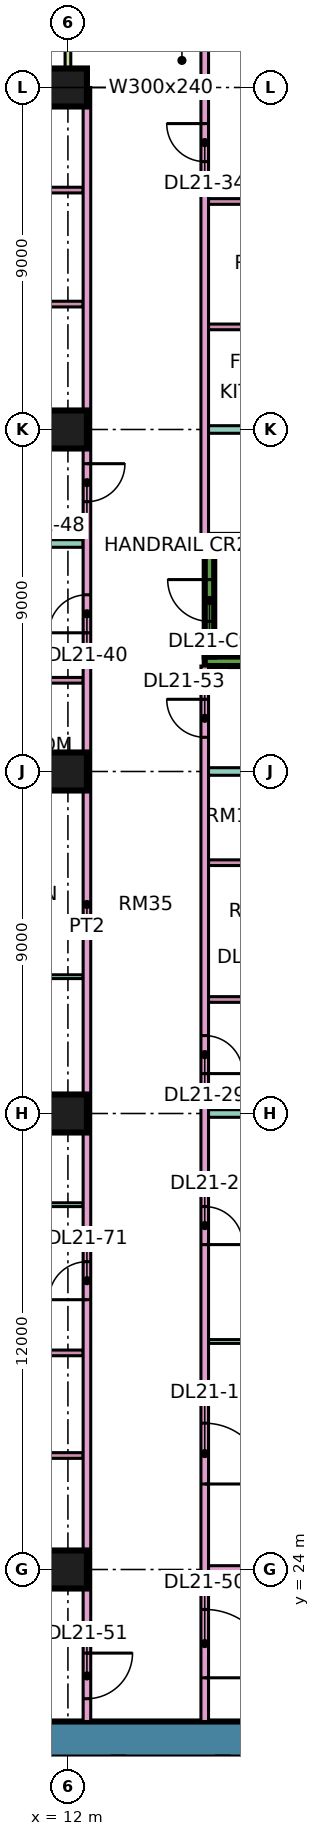
"""IFC4 building model, lengths in metres.
Left out: names, types, materials, properties, quantities, classifications, styles, units other than length and angle.
Written with IfcOpenShell. Run it as: python <this file> out.ifc"""

import sys

from ifc_helpers import new_model, si_unit, direction, frame, frame_2d, origin, origin_2d, place, context, subcontext, project, spatial, rectangle, extrude, element, fill, save


model = new_model("IFC4")
c1 = context("Model", 3, precision=1e-05, world=origin(), true_north=direction((0.0, 1.0)))
c2 = subcontext(c1, "Body", "Model", "MODEL_VIEW")
j1 = project(units=[si_unit("LENGTHUNIT", "METRE"), si_unit("PLANEANGLEUNIT", "RADIAN")], contexts=[c1])
p1 = place(None, origin())
s1 = spatial("IfcSite", under=j1, at=p1, CompositionType="ELEMENT")
p2 = place(p1, origin())
s2 = spatial("IfcBuilding", under=s1, at=p2, CompositionType="ELEMENT")
p3 = place(p2, frame((0.0, 0.0, 95.65)))
s3 = spatial("IfcBuildingStorey", under=s2, at=p3, CompositionType="ELEMENT", Elevation=95.65)
for number, where, z_axis, x_axis in (
    (1, (12.0, 24.0, 0.0), (0.0, 0.0, 1.0), (1.0, 0.0, 0.0)),
    (2, (12.0, 36.0, 0.0), (0.0, 0.0, 1.0), (1.0, 0.0, 0.0)),
    (3, (12.0, 45.0, 0.0), (0.0, 0.0, 1.0), (1.0, 0.0, 0.0)),
    (4, (12.0, 54.0, 0.0), (0.0, 0.0, 1.0), (1.0, 0.0, 0.0)),
    (5, (12.0, 63.0, 0.0), (0.0, 0.0, 1.0), (1.0, 0.0, 0.0)),
):
    element("IfcColumn", number, at=place(p3, frame(where, z_axis=z_axis, x_axis=x_axis)), inside=s3, PredefinedType="COLUMN", context=c2, shape_type="SweptSolid", body=[
        extrude(rectangle(XDim=1.0, YDim=1.0, at=origin_2d()), origin(), (0.0, 0.0, 1.0), 3.75),
    ])
p4 = place(p3, frame((9.0, 19.525, 0.0), z_axis=(0.0, 0.0, 1.0), x_axis=(1.0, 0.0, 0.0)))
e6 = element("IfcWall", 6, at=p4, inside=s3, PredefinedType="SHEAR", context=c2, shape_type="SweptSolid", body=[
    extrude(rectangle(XDim=25.0, YDim=0.95, at=frame_2d((12.5, 0.0))), origin(), (0.0, 0.0, 1.0), 3.75),
])
p5 = place(p4, frame((19.1, 0.0, 0.0)))
e7 = element("IfcOpeningElement", 7, at=p5, cuts=e6, PredefinedType="OPENING", context=c2, shape_type="SweptSolid", body=[
    extrude(rectangle(XDim=1.8, YDim=2.4, at=frame_2d((0.9, 1.2))), frame((0.0, 0.485, 0.0), z_axis=(0.0, -1.0, 0.0), x_axis=(1.0, 0.0, 0.0)), (0.0, 0.0, 1.0), 0.97),
])
for number, where, z_axis, x_axis in (
    (8, (15.6, 47.9, 0.0), (0.0, 0.0, 1.0), (1.0, 0.0, 0.0)),
    (9, (15.6, 51.1, 0.0), (0.0, 0.0, 1.0), (1.0, 0.0, 0.0)),
):
    element("IfcWall", number, at=place(p3, frame(where, z_axis=z_axis, x_axis=x_axis)), inside=s3, PredefinedType="SHEAR", context=c2, shape_type="SweptSolid", body=[
        extrude(rectangle(XDim=7.0, YDim=0.25, at=frame_2d((3.5, 0.0))), origin(), (0.0, 0.0, 1.0), 3.75),
    ])
p6 = place(p3, frame((15.725, 48.025, 0.0), z_axis=(0.0, 0.0, 1.0), x_axis=(0.0, 1.0, 0.0)))
e10 = element("IfcWall", 10, at=p6, inside=s3, PredefinedType="SHEAR", context=c2, shape_type="SweptSolid", body=[
    extrude(rectangle(XDim=2.95, YDim=0.25, at=frame_2d((1.475, 0.0))), origin(), (0.0, 0.0, 1.0), 3.75),
])
p7 = place(p6, frame((0.925, 0.0, 0.0)))
e11 = element("IfcOpeningElement", 11, at=p7, cuts=e10, PredefinedType="OPENING", context=c2, shape_type="SweptSolid", body=[
    extrude(rectangle(XDim=1.1, YDim=2.2, at=frame_2d((0.55, 1.1))), frame((0.0, 0.135, 0.0), z_axis=(0.0, -1.0, 0.0), x_axis=(1.0, 0.0, 0.0)), (0.0, 0.0, 1.0), 0.27),
])
p8 = place(p3, frame((11.925, 63.0, 0.0), z_axis=(0.0, 0.0, 1.0), x_axis=(-1.0, 0.0, 0.0)))
e12 = element("IfcWall", 12, at=p8, inside=s3, PredefinedType="SOLIDWALL", context=c2, shape_type="SweptSolid", body=[
    extrude(rectangle(XDim=10.35, YDim=0.15, at=frame_2d((5.175, 0.0))), origin(), (0.0, 0.0, 1.0), 3.35),
])
p9 = place(p8, frame((1.175, 0.0, 0.45)))
e13 = element("IfcOpeningElement", 13, at=p9, cuts=e12, PredefinedType="OPENING", context=c2, shape_type="SweptSolid", body=[
    extrude(rectangle(XDim=3.0, YDim=2.4, at=frame_2d((1.5, 1.2))), frame((0.0, 0.085, 0.0), z_axis=(0.0, -1.0, 0.0), x_axis=(1.0, 0.0, 0.0)), (0.0, 0.0, 1.0), 0.17),
])
p10 = place(p8, frame((6.688, 0.0, 0.0)))
e14 = element("IfcOpeningElement", 14, at=p10, cuts=e12, PredefinedType="OPENING", context=c2, shape_type="SweptSolid", body=[
    extrude(rectangle(XDim=1.8, YDim=2.4, at=frame_2d((0.9, 1.2))), frame((0.0, 0.085, 0.0), z_axis=(0.0, -1.0, 0.0), x_axis=(1.0, 0.0, 0.0)), (0.0, 0.0, 1.0), 0.17),
])
p11 = place(p3, frame((12.0, 64.5, 0.0), z_axis=(0.0, 0.0, 1.0), x_axis=(0.0, -1.0, 0.0)))
e15 = element("IfcWall", 15, at=p11, inside=s3, PredefinedType="SOLIDWALL", context=c2, shape_type="SweptSolid", body=[
    extrude(rectangle(XDim=1.5, YDim=0.15, at=frame_2d((0.75, 0.0))), origin(), (0.0, 0.0, 1.0), 3.35),
])
p12 = place(p3, frame((-1.35, 22.4, 0.0), z_axis=(0.0, 0.0, 1.0), x_axis=(1.0, 0.0, 0.0)))
e16 = element("IfcWall", 16, at=p12, inside=s3, PredefinedType="PARTITIONING", context=c2, shape_type="SweptSolid", body=[
    extrude(rectangle(XDim=13.75, YDim=0.2, at=frame_2d((6.875, 0.0))), origin(), (0.0, 0.0, 1.0), 3.35),
])
p13 = place(p3, frame((0.0, 36.0, 0.0), z_axis=(0.0, 0.0, 1.0), x_axis=(1.0, 0.0, 0.0)))
e17 = element("IfcWall", 17, at=p13, inside=s3, PredefinedType="PARTITIONING", context=c2, shape_type="SweptSolid", body=[
    extrude(rectangle(XDim=12.4, YDim=0.2, at=frame_2d((6.2, 0.0))), origin(), (0.0, 0.0, 1.0), 3.35),
])
p14 = place(p3, frame((0.074, 51.0, 0.0), z_axis=(0.0, 0.0, 1.0), x_axis=(1.0, 0.0, 0.0)))
e18 = element("IfcWall", 18, at=p14, inside=s3, PredefinedType="PARTITIONING", context=c2, shape_type="SweptSolid", body=[
    extrude(rectangle(XDim=12.326, YDim=0.2, at=frame_2d((6.163, 0.0))), origin(), (0.0, 0.0, 1.0), 3.35),
])
p15 = place(p3, frame((7.05, 33.6, 0.0), z_axis=(0.0, 0.0, 1.0), x_axis=(1.0, 0.0, 0.0)))
e19 = element("IfcWall", 19, at=p15, inside=s3, PredefinedType="PARTITIONING", context=c2, shape_type="SweptSolid", body=[
    extrude(rectangle(XDim=5.35, YDim=0.1, at=frame_2d((2.675, 0.0))), origin(), (0.0, 0.0, 1.0), 3.35),
])
for number, where, z_axis, x_axis in (
    (20, (7.175, 27.0, 0.0), (0.0, 0.0, 1.0), (1.0, 0.0, 0.0)),
    (21, (7.175, 29.7, 0.0), (0.0, 0.0, 1.0), (1.0, 0.0, 0.0)),
    (22, (7.175, 54.3, 0.0), (0.0, 0.0, 1.0), (1.0, 0.0, 0.0)),
    (23, (7.175, 57.3, 0.0), (0.0, 0.0, 1.0), (1.0, 0.0, 0.0)),
    (24, (7.175, 60.3, 0.0), (0.0, 0.0, 1.0), (1.0, 0.0, 0.0)),
):
    element("IfcWall", number, at=place(p3, frame(where, z_axis=z_axis, x_axis=x_axis)), inside=s3, PredefinedType="PARTITIONING", context=c2, shape_type="SweptSolid", body=[
        extrude(rectangle(XDim=5.225, YDim=0.15, at=frame_2d((2.612, 0.0))), origin(), (0.0, 0.0, 1.0), 3.35),
    ])
p16 = place(p3, frame((8.375, 39.6, 0.0), z_axis=(0.0, 0.0, 1.0), x_axis=(1.0, 0.0, 0.0)))
e25 = element("IfcWall", 25, at=p16, inside=s3, PredefinedType="PARTITIONING", context=c2, shape_type="SweptSolid", body=[
    extrude(rectangle(XDim=4.025, YDim=0.1, at=frame_2d((2.012, 0.0))), origin(), (0.0, 0.0, 1.0), 3.35),
])
for number, where, z_axis, x_axis in (
    (26, (8.375, 44.7, 0.0), (0.0, 0.0, 1.0), (1.0, 0.0, 0.0)),
    (27, (8.375, 47.4, 0.0), (0.0, 0.0, 1.0), (1.0, 0.0, 0.0)),
):
    element("IfcWall", number, at=place(p3, frame(where, z_axis=z_axis, x_axis=x_axis)), inside=s3, PredefinedType="PARTITIONING", context=c2, shape_type="SweptSolid", body=[
        extrude(rectangle(XDim=4.025, YDim=0.15, at=frame_2d((2.012, 0.0))), origin(), (0.0, 0.0, 1.0), 3.35),
    ])
p17 = place(p3, frame((12.5, 20.0, 0.0), z_axis=(0.0, 0.0, 1.0), x_axis=(0.0, 1.0, 0.0)))
e28 = element("IfcWall", 28, at=p17, inside=s3, PredefinedType="PARTITIONING", context=c2, shape_type="SweptSolid", body=[
    extrude(rectangle(XDim=43.0, YDim=0.2, at=frame_2d((21.5, 0.0))), origin(), (0.0, 0.0, 1.0), 3.35),
])
p18 = place(p17, frame((28.65, 0.0, 0.0)))
e29 = element("IfcOpeningElement", 29, at=p18, cuts=e28, PredefinedType="OPENING", context=c2, shape_type="SweptSolid", body=[
    extrude(rectangle(XDim=1.0, YDim=2.1, at=frame_2d((0.5, 1.05))), frame((0.0, 0.11, 0.0), z_axis=(0.0, -1.0, 0.0), x_axis=(1.0, 0.0, 0.0)), (0.0, 0.0, 1.0), 0.22),
])
p19 = place(p17, frame((32.1, 0.0, 0.0)))
e30 = element("IfcOpeningElement", 30, at=p19, cuts=e28, PredefinedType="OPENING", context=c2, shape_type="SweptSolid", body=[
    extrude(rectangle(XDim=1.0, YDim=2.1, at=frame_2d((0.5, 1.05))), frame((0.0, 0.11, 0.0), z_axis=(0.0, -1.0, 0.0), x_axis=(1.0, 0.0, 0.0)), (0.0, 0.0, 1.0), 0.22),
])
p20 = place(p17, frame((0.6, 0.0, 0.0)))
e31 = element("IfcOpeningElement", 31, at=p20, cuts=e28, PredefinedType="OPENING", context=c2, shape_type="SweptSolid", body=[
    extrude(rectangle(XDim=1.2, YDim=2.1, at=frame_2d((0.6, 1.05))), frame((0.0, 0.11, 0.0), z_axis=(0.0, -1.0, 0.0), x_axis=(1.0, 0.0, 0.0)), (0.0, 0.0, 1.0), 0.22),
])
p21 = place(p17, frame((11.1, 0.0, 0.0)))
e32 = element("IfcOpeningElement", 32, at=p21, cuts=e28, PredefinedType="OPENING", context=c2, shape_type="SweptSolid", body=[
    extrude(rectangle(XDim=1.0, YDim=2.1, at=frame_2d((0.5, 1.05))), frame((0.0, 0.11, 0.0), z_axis=(0.0, -1.0, 0.0), x_axis=(1.0, 0.0, 0.0)), (0.0, 0.0, 1.0), 0.22),
])
p22 = place(p3, frame((15.6, 20.0, 0.0), z_axis=(0.0, 0.0, 1.0), x_axis=(0.0, 1.0, 0.0)))
e33 = element("IfcWall", 33, at=p22, inside=s3, PredefinedType="PARTITIONING", context=c2, shape_type="SweptSolid", body=[
    extrude(rectangle(XDim=27.775, YDim=0.2, at=frame_2d((13.887, 0.0))), origin(), (0.0, 0.0, 1.0), 3.35),
])
p23 = place(p22, frame((6.25, 0.0, 0.0)))
e34 = element("IfcOpeningElement", 34, at=p23, cuts=e33, PredefinedType="OPENING", context=c2, shape_type="SweptSolid", body=[
    extrude(rectangle(XDim=1.6, YDim=2.1, at=frame_2d((0.8, 1.05))), frame((0.0, 0.11, 0.0), z_axis=(0.0, -1.0, 0.0), x_axis=(1.0, 0.0, 0.0)), (0.0, 0.0, 1.0), 0.22),
])
p24 = place(p22, frame((12.55, 0.0, 0.0)))
e35 = element("IfcOpeningElement", 35, at=p24, cuts=e33, PredefinedType="OPENING", context=c2, shape_type="SweptSolid", body=[
    extrude(rectangle(XDim=1.0, YDim=2.1, at=frame_2d((0.5, 1.05))), frame((0.0, 0.11, 0.0), z_axis=(0.0, -1.0, 0.0), x_axis=(1.0, 0.0, 0.0)), (0.0, 0.0, 1.0), 0.22),
])
p25 = place(p22, frame((17.05, 0.0, 0.0)))
e36 = element("IfcOpeningElement", 36, at=p25, cuts=e33, PredefinedType="OPENING", context=c2, shape_type="SweptSolid", body=[
    extrude(rectangle(XDim=1.0, YDim=2.1, at=frame_2d((0.5, 1.05))), frame((0.0, 0.11, 0.0), z_axis=(0.0, -1.0, 0.0), x_axis=(1.0, 0.0, 0.0)), (0.0, 0.0, 1.0), 0.22),
])
p26 = place(p22, frame((1.15, 0.0, 0.0)))
e37 = element("IfcOpeningElement", 37, at=p26, cuts=e33, PredefinedType="OPENING", context=c2, shape_type="SweptSolid", body=[
    extrude(rectangle(XDim=1.8, YDim=2.1, at=frame_2d((0.9, 1.05))), frame((0.0, 0.11, 0.0), z_axis=(0.0, -1.0, 0.0), x_axis=(1.0, 0.0, 0.0)), (0.0, 0.0, 1.0), 0.22),
])
p27 = place(p22, frame((25.9, 0.0, 0.0)))
e38 = element("IfcOpeningElement", 38, at=p27, cuts=e33, PredefinedType="OPENING", context=c2, shape_type="SweptSolid", body=[
    extrude(rectangle(XDim=1.0, YDim=2.1, at=frame_2d((0.5, 1.05))), frame((0.0, 0.11, 0.0), z_axis=(0.0, -1.0, 0.0), x_axis=(1.0, 0.0, 0.0)), (0.0, 0.0, 1.0), 0.22),
])
p28 = place(p3, frame((15.6, 51.225, 0.0), z_axis=(0.0, 0.0, 1.0), x_axis=(0.0, 1.0, 0.0)))
e39 = element("IfcWall", 39, at=p28, inside=s3, PredefinedType="PARTITIONING", context=c2, shape_type="SweptSolid", body=[
    extrude(rectangle(XDim=13.125, YDim=0.2, at=frame_2d((6.562, 0.0))), origin(), (0.0, 0.0, 1.0), 3.35),
])
p29 = place(p28, frame((9.825, 0.0, 0.0)))
e40 = element("IfcOpeningElement", 40, at=p29, cuts=e39, PredefinedType="OPENING", context=c2, shape_type="SweptSolid", body=[
    extrude(rectangle(XDim=1.0, YDim=2.1, at=frame_2d((0.5, 1.05))), frame((0.0, 0.11, 0.0), z_axis=(0.0, -1.0, 0.0), x_axis=(1.0, 0.0, 0.0)), (0.0, 0.0, 1.0), 0.22),
])
p30 = place(p3, frame((15.7, 24.0, 0.0), z_axis=(0.0, 0.0, 1.0), x_axis=(1.0, 0.0, 0.0)))
e41 = element("IfcWall", 41, at=p30, inside=s3, PredefinedType="PARTITIONING", context=c2, shape_type="SweptSolid", body=[
    extrude(rectangle(XDim=5.8, YDim=0.2, at=frame_2d((2.9, 0.0))), origin(), (0.0, 0.0, 1.0), 3.35),
])
p31 = place(p3, frame((15.7, 30.0, 0.0), z_axis=(0.0, 0.0, 1.0), x_axis=(1.0, 0.0, 0.0)))
e42 = element("IfcWall", 42, at=p31, inside=s3, PredefinedType="PARTITIONING", context=c2, shape_type="SweptSolid", body=[
    extrude(rectangle(XDim=5.8, YDim=0.1, at=frame_2d((2.9, 0.0))), origin(), (0.0, 0.0, 1.0), 3.35),
])
p32 = place(p3, frame((15.7, 36.0, 0.0), z_axis=(0.0, 0.0, 1.0), x_axis=(1.0, 0.0, 0.0)))
e43 = element("IfcWall", 43, at=p32, inside=s3, PredefinedType="PARTITIONING", context=c2, shape_type="SweptSolid", body=[
    extrude(rectangle(XDim=8.3, YDim=0.2, at=frame_2d((4.15, 0.0))), origin(), (0.0, 0.0, 1.0), 3.35),
])
p33 = place(p3, frame((15.7, 39.0, 0.0), z_axis=(0.0, 0.0, 1.0), x_axis=(1.0, 0.0, 0.0)))
e44 = element("IfcWall", 44, at=p33, inside=s3, PredefinedType="PARTITIONING", context=c2, shape_type="SweptSolid", body=[
    extrude(rectangle(XDim=2.525, YDim=0.15, at=frame_2d((1.263, 0.0))), origin(), (0.0, 0.0, 1.0), 3.35),
])
p34 = place(p33, frame((0.9, 0.0, 0.0)))
e45 = element("IfcOpeningElement", 45, at=p34, cuts=e44, PredefinedType="OPENING", context=c2, shape_type="SweptSolid", body=[
    extrude(rectangle(XDim=0.8, YDim=2.1, at=frame_2d((0.4, 1.05))), frame((0.0, 0.085, 0.0), z_axis=(0.0, -1.0, 0.0), x_axis=(1.0, 0.0, 0.0)), (0.0, 0.0, 1.0), 0.17),
])
p35 = place(p3, frame((15.7, 42.6, 0.0), z_axis=(0.0, 0.0, 1.0), x_axis=(1.0, 0.0, 0.0)))
e46 = element("IfcWall", 46, at=p35, inside=s3, PredefinedType="PARTITIONING", context=c2, shape_type="SweptSolid", body=[
    extrude(rectangle(XDim=2.525, YDim=0.15, at=frame_2d((1.263, 0.0))), origin(), (0.0, 0.0, 1.0), 3.35),
])
p36 = place(p3, frame((15.7, 45.0, 0.0), z_axis=(0.0, 0.0, 1.0), x_axis=(1.0, 0.0, 0.0)))
e47 = element("IfcWall", 47, at=p36, inside=s3, PredefinedType="PARTITIONING", context=c2, shape_type="SweptSolid", body=[
    extrude(rectangle(XDim=8.3, YDim=0.2, at=frame_2d((4.15, 0.0))), origin(), (0.0, 0.0, 1.0), 3.35),
])
p37 = place(p3, frame((15.7, 54.0, 0.0), z_axis=(0.0, 0.0, 1.0), x_axis=(1.0, 0.0, 0.0)))
e48 = element("IfcWall", 48, at=p37, inside=s3, PredefinedType="PARTITIONING", context=c2, shape_type="SweptSolid", body=[
    extrude(rectangle(XDim=8.226, YDim=0.2, at=frame_2d((4.113, 0.0))), origin(), (0.0, 0.0, 1.0), 3.35),
])
for number, where, z_axis, x_axis in (
    (49, (15.7, 56.7, 0.0), (0.0, 0.0, 1.0), (1.0, 0.0, 0.0)),
    (50, (15.7, 60.0, 0.0), (0.0, 0.0, 1.0), (1.0, 0.0, 0.0)),
):
    element("IfcWall", number, at=place(p3, frame(where, z_axis=z_axis, x_axis=x_axis)), inside=s3, PredefinedType="PARTITIONING", context=c2, shape_type="SweptSolid", body=[
        extrude(rectangle(XDim=2.825, YDim=0.15, at=frame_2d((1.413, 0.0))), origin(), (0.0, 0.0, 1.0), 3.35),
    ])
p38 = place(p7, frame((1.1, 0.0, 0.0), z_axis=(0.0, 0.0, 1.0), x_axis=(-1.0, 0.0, 0.0)))
e51 = element("IfcDoor", 51, at=p38, inside=s3, OperationType="SINGLE_SWING_RIGHT", PredefinedType="DOOR", context=c2, shape_type="SweptSolid", body=[
    extrude(rectangle(XDim=1.1, YDim=2.2, at=frame_2d((0.55, 1.1))), frame((0.0, 0.025, 0.0), z_axis=(0.0, -1.0, 0.0), x_axis=(1.0, 0.0, 0.0)), (0.0, 0.0, 1.0), 0.05),
])
fill(e11, e51)
p39 = place(p23, frame((1.6, 0.0, 0.0), z_axis=(0.0, 0.0, 1.0), x_axis=(-1.0, 0.0, 0.0)))
e52 = element("IfcDoor", 52, at=p39, inside=s3, OperationType="DOUBLE_DOOR_SINGLE_SWING", PredefinedType="DOOR", context=c2, shape_type="SweptSolid", body=[
    extrude(rectangle(XDim=1.6, YDim=2.1, at=frame_2d((0.8, 1.05))), frame((0.0, 0.025, 0.0), z_axis=(0.0, -1.0, 0.0), x_axis=(1.0, 0.0, 0.0)), (0.0, 0.0, 1.0), 0.05),
])
fill(e34, e52)
p40 = place(p24, frame((1.0, 0.0, 0.0), z_axis=(0.0, 0.0, 1.0), x_axis=(-1.0, 0.0, 0.0)))
e53 = element("IfcDoor", 53, at=p40, inside=s3, OperationType="SINGLE_SWING_LEFT", PredefinedType="DOOR", context=c2, shape_type="SweptSolid", body=[
    extrude(rectangle(XDim=1.0, YDim=2.1, at=frame_2d((0.5, 1.05))), frame((0.0, 0.025, 0.0), z_axis=(0.0, -1.0, 0.0), x_axis=(1.0, 0.0, 0.0)), (0.0, 0.0, 1.0), 0.05),
])
fill(e35, e53)
p41 = place(p25, frame((1.0, 0.0, 0.0), z_axis=(0.0, 0.0, 1.0), x_axis=(-1.0, 0.0, 0.0)))
e54 = element("IfcDoor", 54, at=p41, inside=s3, OperationType="SINGLE_SWING_LEFT", PredefinedType="DOOR", context=c2, shape_type="SweptSolid", body=[
    extrude(rectangle(XDim=1.0, YDim=2.1, at=frame_2d((0.5, 1.05))), frame((0.0, 0.025, 0.0), z_axis=(0.0, -1.0, 0.0), x_axis=(1.0, 0.0, 0.0)), (0.0, 0.0, 1.0), 0.05),
])
fill(e36, e54)
p42 = place(p29, frame((1.0, 0.0, 0.0), z_axis=(0.0, 0.0, 1.0), x_axis=(-1.0, 0.0, 0.0)))
e55 = element("IfcDoor", 55, at=p42, inside=s3, OperationType="SINGLE_SWING_RIGHT", PredefinedType="DOOR", context=c2, shape_type="SweptSolid", body=[
    extrude(rectangle(XDim=1.0, YDim=2.1, at=frame_2d((0.5, 1.05))), frame((0.0, 0.025, 0.0), z_axis=(0.0, -1.0, 0.0), x_axis=(1.0, 0.0, 0.0)), (0.0, 0.0, 1.0), 0.05),
])
fill(e40, e55)
p43 = place(p18, origin())
e56 = element("IfcDoor", 56, at=p43, inside=s3, OperationType="SINGLE_SWING_LEFT", PredefinedType="DOOR", context=c2, shape_type="SweptSolid", body=[
    extrude(rectangle(XDim=1.0, YDim=2.1, at=frame_2d((0.5, 1.05))), frame((0.0, 0.025, 0.0), z_axis=(0.0, -1.0, 0.0), x_axis=(1.0, 0.0, 0.0)), (0.0, 0.0, 1.0), 0.05),
])
fill(e29, e56)
p44 = place(p19, origin())
e57 = element("IfcDoor", 57, at=p44, inside=s3, OperationType="SINGLE_SWING_RIGHT", PredefinedType="DOOR", context=c2, shape_type="SweptSolid", body=[
    extrude(rectangle(XDim=1.0, YDim=2.1, at=frame_2d((0.5, 1.05))), frame((0.0, 0.025, 0.0), z_axis=(0.0, -1.0, 0.0), x_axis=(1.0, 0.0, 0.0)), (0.0, 0.0, 1.0), 0.05),
])
fill(e30, e57)
p45 = place(p26, frame((1.8, 0.0, 0.0), z_axis=(0.0, 0.0, 1.0), x_axis=(-1.0, 0.0, 0.0)))
e58 = element("IfcDoor", 58, at=p45, inside=s3, OperationType="DOUBLE_DOOR_SINGLE_SWING", PredefinedType="DOOR", context=c2, shape_type="SweptSolid", body=[
    extrude(rectangle(XDim=1.8, YDim=2.1, at=frame_2d((0.9, 1.05))), frame((0.0, 0.025, 0.0), z_axis=(0.0, -1.0, 0.0), x_axis=(1.0, 0.0, 0.0)), (0.0, 0.0, 1.0), 0.05),
])
fill(e37, e58)
p46 = place(p20, origin())
e59 = element("IfcDoor", 59, at=p46, inside=s3, OperationType="SINGLE_SWING_RIGHT", PredefinedType="DOOR", context=c2, shape_type="SweptSolid", body=[
    extrude(rectangle(XDim=1.2, YDim=2.1, at=frame_2d((0.6, 1.05))), frame((0.0, 0.025, 0.0), z_axis=(0.0, -1.0, 0.0), x_axis=(1.0, 0.0, 0.0)), (0.0, 0.0, 1.0), 0.05),
])
fill(e31, e59)
p47 = place(p27, frame((1.0, 0.0, 0.0), z_axis=(0.0, 0.0, 1.0), x_axis=(-1.0, 0.0, 0.0)))
e60 = element("IfcDoor", 60, at=p47, inside=s3, OperationType="SINGLE_SWING_RIGHT", PredefinedType="DOOR", context=c2, shape_type="SweptSolid", body=[
    extrude(rectangle(XDim=1.0, YDim=2.1, at=frame_2d((0.5, 1.05))), frame((0.0, 0.025, 0.0), z_axis=(0.0, -1.0, 0.0), x_axis=(1.0, 0.0, 0.0)), (0.0, 0.0, 1.0), 0.05),
])
fill(e38, e60)
p48 = place(p21, origin())
e61 = element("IfcDoor", 61, at=p48, inside=s3, OperationType="SINGLE_SWING_LEFT", PredefinedType="DOOR", context=c2, shape_type="SweptSolid", body=[
    extrude(rectangle(XDim=1.0, YDim=2.1, at=frame_2d((0.5, 1.05))), frame((0.0, 0.025, 0.0), z_axis=(0.0, -1.0, 0.0), x_axis=(1.0, 0.0, 0.0)), (0.0, 0.0, 1.0), 0.05),
])
fill(e32, e61)
save(model, sys.argv[1])
